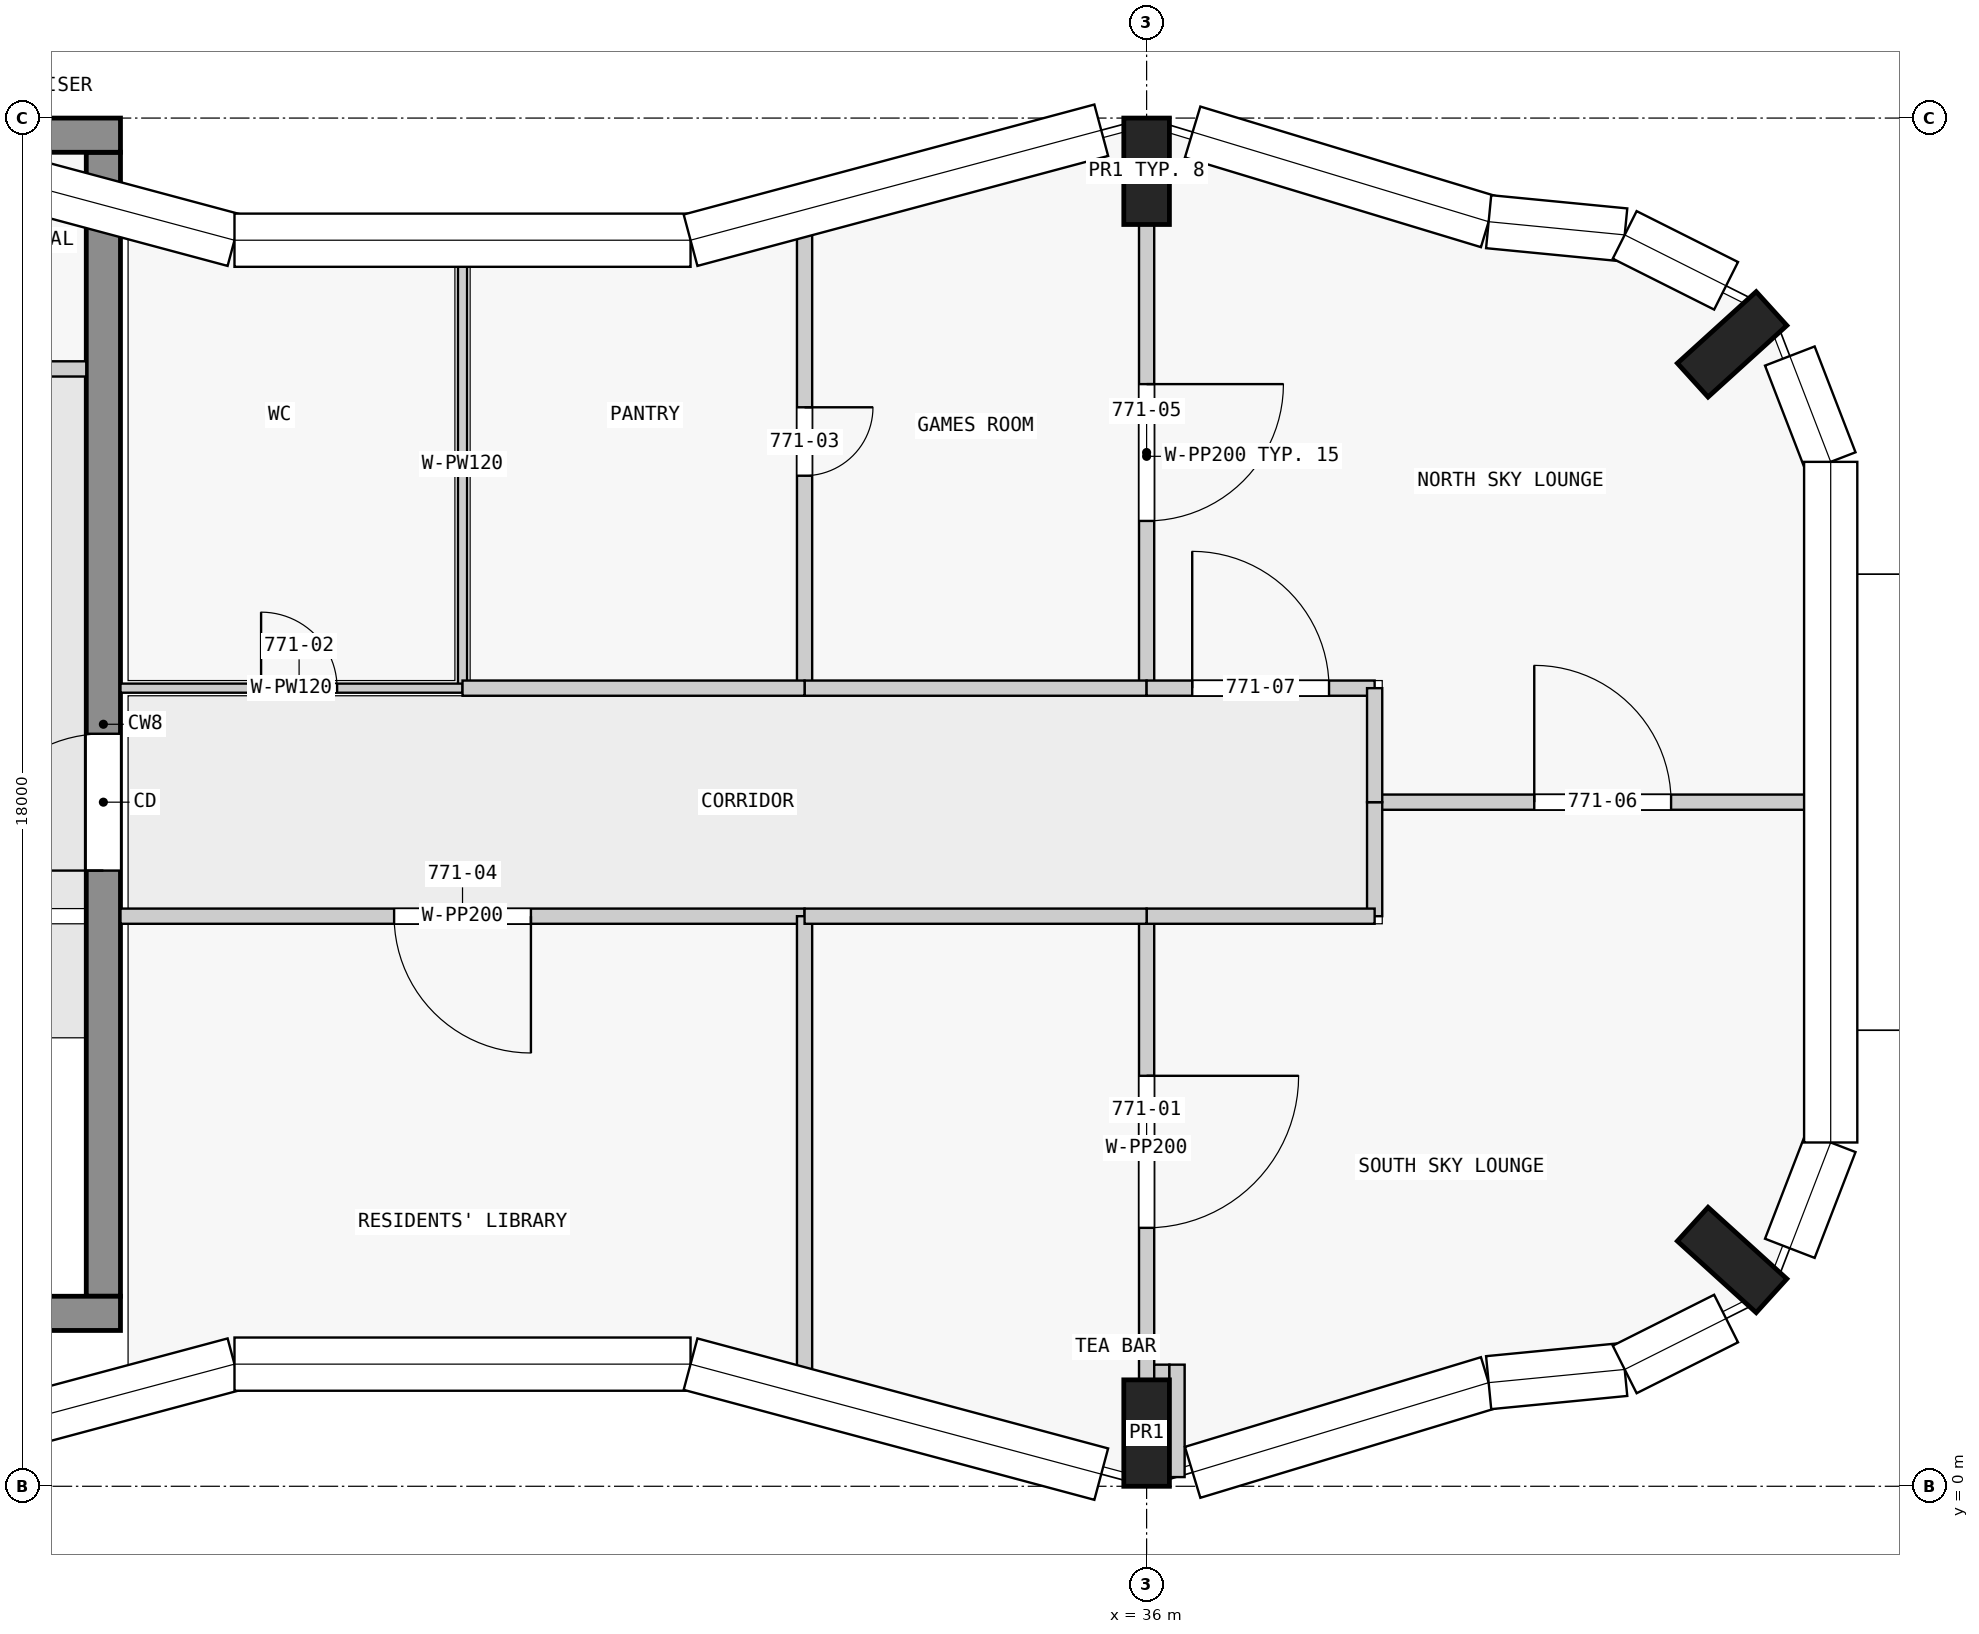
"""IFC4 building model, lengths in metres.
Left out: names, types, materials, properties, quantities, classifications, styles, units other than length and angle.
Written with IfcOpenShell. Run it as: python <this file> out.ifc"""

import sys

from ifc_helpers import new_model, si_unit, direction, frame, frame_2d, origin, origin_2d, place, context, subcontext, project, spatial, rectangle, extrude, element, fill, save


model = new_model("IFC4")
c1 = context("Model", 3, precision=1e-05, world=origin(), true_north=direction((0.0, 1.0)))
c2 = subcontext(c1, "Body", "Model", "MODEL_VIEW")
j1 = project(units=[si_unit("LENGTHUNIT", "METRE"), si_unit("PLANEANGLEUNIT", "RADIAN")], contexts=[c1])
p1 = place(None, origin())
s1 = spatial("IfcSite", under=j1, at=p1, CompositionType="ELEMENT")
p2 = place(p1, origin())
s2 = spatial("IfcBuilding", under=s1, at=p2, CompositionType="ELEMENT")
p3 = place(p2, frame((0.0, 0.0, 291.4)))
s3 = spatial("IfcBuildingStorey", under=s2, at=p3, CompositionType="ELEMENT", Elevation=291.4)
for number, where, z_axis, x_axis in (
    (1, (36.0, 0.7, 0.0), (0.0, 0.0, 1.0), (1.0, 0.0, 0.0)),
    (2, (43.703, 2.977, 0.0), (0.0, 0.0, 1.0), (0.672, 0.74, 0.0)),
    (3, (43.703, 15.023, 0.0), (0.0, 0.0, 1.0), (-0.672, 0.74, 0.0)),
    (4, (36.0, 17.3, 0.0), (0.0, 0.0, 1.0), (1.0, 0.0, 0.0)),
):
    element("IfcColumn", number, at=place(p3, frame(where, z_axis=z_axis, x_axis=x_axis)), inside=s3, PredefinedType="COLUMN", context=c2, shape_type="SweptSolid", body=[
        extrude(rectangle(XDim=0.6, YDim=1.4, at=origin_2d()), origin(), (0.0, 0.0, 1.0), 3.5),
    ])
for number, where, z_axis, x_axis in (
    (5, (1.85, 2.275, 0.0), (0.0, 0.0, 1.0), (1.0, 0.0, 0.0)),
    (6, (1.85, 17.775, 0.0), (0.0, 0.0, 1.0), (1.0, 0.0, 0.0)),
):
    element("IfcWall", number, at=place(p3, frame(where, z_axis=z_axis, x_axis=x_axis)), inside=s3, PredefinedType="SHEAR", context=c2, shape_type="SweptSolid", body=[
        extrude(rectangle(XDim=20.65, YDim=0.45, at=frame_2d((10.325, 0.0))), origin(), (0.0, 0.0, 1.0), 3.05),
    ])
p4 = place(p3, frame((22.275, 2.5, 0.0), z_axis=(0.0, 0.0, 1.0), x_axis=(0.0, 1.0, 0.0)))
e7 = element("IfcWall", 7, at=p4, inside=s3, PredefinedType="SHEAR", context=c2, shape_type="SweptSolid", body=[
    extrude(rectangle(XDim=15.05, YDim=0.45, at=frame_2d((7.525, 0.0))), origin(), (0.0, 0.0, 1.0), 3.05),
])
p5 = place(p4, frame((5.6, 0.0, 0.0)))
e8 = element("IfcOpeningElement", 8, at=p5, cuts=e7, PredefinedType="OPENING", context=c2, shape_type="SweptSolid", body=[
    extrude(rectangle(XDim=1.8, YDim=2.1, at=frame_2d((0.9, 1.05))), frame((0.0, 0.235, 0.0), z_axis=(0.0, -1.0, 0.0), x_axis=(1.0, 0.0, 0.0)), (0.0, 0.0, 1.0), 0.47),
])
p6 = place(p3, frame((18.6, 14.7, 0.0), z_axis=(0.0, 0.0, 1.0), x_axis=(1.0, 0.0, 0.0)))
e9 = element("IfcWall", 9, at=p6, inside=s3, PredefinedType="PARTITIONING", context=c2, shape_type="SweptSolid", body=[
    extrude(rectangle(XDim=3.45, YDim=0.2, at=frame_2d((1.725, 0.0))), origin(), (0.0, 0.0, 1.0), 3.05),
])
p7 = place(p6, frame((0.3, 0.0, 0.0)))
e10 = element("IfcOpeningElement", 10, at=p7, cuts=e9, PredefinedType="OPENING", context=c2, shape_type="SweptSolid", body=[
    extrude(rectangle(XDim=0.9, YDim=2.1, at=frame_2d((0.45, 1.05))), frame((0.0, 0.11, 0.0), z_axis=(0.0, -1.0, 0.0), x_axis=(1.0, 0.0, 0.0)), (0.0, 0.0, 1.0), 0.22),
])
p8 = place(p6, frame((2.025, 0.0, 0.0)))
e11 = element("IfcOpeningElement", 11, at=p8, cuts=e9, PredefinedType="OPENING", context=c2, shape_type="SweptSolid", body=[
    extrude(rectangle(XDim=0.9, YDim=2.1, at=frame_2d((0.45, 1.05))), frame((0.0, 0.11, 0.0), z_axis=(0.0, -1.0, 0.0), x_axis=(1.0, 0.0, 0.0)), (0.0, 0.0, 1.0), 0.22),
])
p9 = place(p3, frame((31.5, 7.5, 0.0), z_axis=(0.0, 0.0, 1.0), x_axis=(-1.0, 0.0, 0.0)))
e12 = element("IfcWall", 12, at=p9, inside=s3, PredefinedType="PARTITIONING", context=c2, shape_type="SweptSolid", body=[
    extrude(rectangle(XDim=9.0, YDim=0.2, at=frame_2d((4.5, 0.0))), origin(), (0.0, 0.0, 1.0), 3.05),
])
p10 = place(p9, frame((3.6, 0.0, 0.0)))
e13 = element("IfcOpeningElement", 13, at=p10, cuts=e12, PredefinedType="OPENING", context=c2, shape_type="SweptSolid", body=[
    extrude(rectangle(XDim=1.8, YDim=2.1, at=frame_2d((0.9, 1.05))), frame((0.0, 0.11, 0.0), z_axis=(0.0, -1.0, 0.0), x_axis=(1.0, 0.0, 0.0)), (0.0, 0.0, 1.0), 0.22),
])
p11 = place(p3, frame((36.0, 7.5, 0.0), z_axis=(0.0, 0.0, 1.0), x_axis=(0.0, -1.0, 0.0)))
e14 = element("IfcWall", 14, at=p11, inside=s3, PredefinedType="PARTITIONING", context=c2, shape_type="SweptSolid", body=[
    extrude(rectangle(XDim=6.1, YDim=0.2, at=frame_2d((3.05, 0.0))), origin(), (0.0, 0.0, 1.0), 3.05),
])
p12 = place(p11, frame((2.1, 0.0, 0.0)))
e15 = element("IfcOpeningElement", 15, at=p12, cuts=e14, PredefinedType="OPENING", context=c2, shape_type="SweptSolid", body=[
    extrude(rectangle(XDim=2.0, YDim=2.4, at=frame_2d((1.0, 1.2))), frame((0.0, 0.11, 0.0), z_axis=(0.0, -1.0, 0.0), x_axis=(1.0, 0.0, 0.0)), (0.0, 0.0, 1.0), 0.22),
])
p13 = place(p3, frame((36.1, 1.5, 0.0), z_axis=(0.0, 0.0, 1.0), x_axis=(1.0, 0.0, 0.0)))
e16 = element("IfcWall", 16, at=p13, inside=s3, PredefinedType="PARTITIONING", context=c2, shape_type="SweptSolid", body=[
    extrude(rectangle(XDim=0.2, YDim=0.2, at=frame_2d((0.1, 0.0))), origin(), (0.0, 0.0, 1.0), 3.05),
])
p14 = place(p3, frame((36.4, 1.6, 0.0), z_axis=(0.0, 0.0, 1.0), x_axis=(0.0, -1.0, 0.0)))
e17 = element("IfcWall", 17, at=p14, inside=s3, PredefinedType="PARTITIONING", context=c2, shape_type="SweptSolid", body=[
    extrude(rectangle(XDim=1.479, YDim=0.2, at=frame_2d((0.74, 0.0))), origin(), (0.0, 0.0, 1.0), 2.517),
])
p15 = place(p3, frame((36.0, 16.6, 0.0), z_axis=(0.0, 0.0, 1.0), x_axis=(0.0, -1.0, 0.0)))
e18 = element("IfcWall", 18, at=p15, inside=s3, PredefinedType="PARTITIONING", context=c2, shape_type="SweptSolid", body=[
    extrude(rectangle(XDim=6.1, YDim=0.2, at=frame_2d((3.05, 0.0))), origin(), (0.0, 0.0, 1.0), 3.05),
])
p16 = place(p15, frame((2.1, 0.0, 0.0)))
e19 = element("IfcOpeningElement", 19, at=p16, cuts=e18, PredefinedType="OPENING", context=c2, shape_type="SweptSolid", body=[
    extrude(rectangle(XDim=1.8, YDim=2.1, at=frame_2d((0.9, 1.05))), frame((0.0, 0.11, 0.0), z_axis=(0.0, -1.0, 0.0), x_axis=(1.0, 0.0, 0.0)), (0.0, 0.0, 1.0), 0.22),
])
p17 = place(p3, frame((31.5, 16.795, 0.0), z_axis=(0.0, 0.0, 1.0), x_axis=(0.0, -1.0, 0.0)))
e20 = element("IfcWall", 20, at=p17, inside=s3, PredefinedType="PARTITIONING", context=c2, shape_type="SweptSolid", body=[
    extrude(rectangle(XDim=6.295, YDim=0.2, at=frame_2d((3.147, 0.0))), origin(), (0.0, 0.0, 1.0), 3.05),
])
p18 = place(p17, frame((2.6, 0.0, 0.0)))
e21 = element("IfcOpeningElement", 21, at=p18, cuts=e20, PredefinedType="OPENING", context=c2, shape_type="SweptSolid", body=[
    extrude(rectangle(XDim=0.9, YDim=2.1, at=frame_2d((0.45, 1.05))), frame((0.0, 0.11, 0.0), z_axis=(0.0, -1.0, 0.0), x_axis=(1.0, 0.0, 0.0)), (0.0, 0.0, 1.0), 0.22),
])
p19 = place(p3, frame((31.5, 7.5, 0.0), z_axis=(0.0, 0.0, 1.0), x_axis=(0.0, -1.0, 0.0)))
e22 = element("IfcWall", 22, at=p19, inside=s3, PredefinedType="PARTITIONING", context=c2, shape_type="SweptSolid", body=[
    extrude(rectangle(XDim=6.295, YDim=0.2, at=frame_2d((3.147, 0.0))), origin(), (0.0, 0.0, 1.0), 3.05),
])
p20 = place(p3, frame((39.0, 9.0, 0.0), z_axis=(0.0, 0.0, 1.0), x_axis=(1.0, 0.0, 0.0)))
e23 = element("IfcWall", 23, at=p20, inside=s3, PredefinedType="PARTITIONING", context=c2, shape_type="SweptSolid", body=[
    extrude(rectangle(XDim=6.0, YDim=0.2, at=frame_2d((3.0, 0.0))), origin(), (0.0, 0.0, 1.0), 3.05),
])
p21 = place(p20, frame((2.1, 0.0, 0.0)))
e24 = element("IfcOpeningElement", 24, at=p21, cuts=e23, PredefinedType="OPENING", context=c2, shape_type="SweptSolid", body=[
    extrude(rectangle(XDim=1.8, YDim=2.1, at=frame_2d((0.9, 1.05))), frame((0.0, 0.11, 0.0), z_axis=(0.0, -1.0, 0.0), x_axis=(1.0, 0.0, 0.0)), (0.0, 0.0, 1.0), 0.22),
])
p22 = place(p3, frame((27.0, 16.393, 0.0), z_axis=(0.0, 0.0, 1.0), x_axis=(0.0, -1.0, 0.0)))
e25 = element("IfcWall", 25, at=p22, inside=s3, PredefinedType="PARTITIONING", context=c2, shape_type="SweptSolid", body=[
    extrude(rectangle(XDim=5.893, YDim=0.12, at=frame_2d((2.947, 0.0))), origin(), (0.0, 0.0, 1.0), 3.05),
])
p23 = place(p3, frame((39.0, 9.0, 0.0), z_axis=(0.0, 0.0, 1.0), x_axis=(0.0, -1.0, 0.0)))
e26 = element("IfcWall", 26, at=p23, inside=s3, PredefinedType="PARTITIONING", context=c2, shape_type="SweptSolid", body=[
    extrude(rectangle(XDim=1.5, YDim=0.2, at=frame_2d((0.75, 0.0))), origin(), (0.0, 0.0, 1.0), 3.05),
])
p24 = place(p3, frame((39.0, 7.5, 0.0), z_axis=(0.0, 0.0, 1.0), x_axis=(-1.0, 0.0, 0.0)))
e27 = element("IfcWall", 27, at=p24, inside=s3, PredefinedType="PARTITIONING", context=c2, shape_type="SweptSolid", body=[
    extrude(rectangle(XDim=3.0, YDim=0.2, at=frame_2d((1.5, 0.0))), origin(), (0.0, 0.0, 1.0), 3.05),
])
p25 = place(p3, frame((31.5, 10.5, 0.0), z_axis=(0.0, 0.0, 1.0), x_axis=(1.0, 0.0, 0.0)))
e28 = element("IfcWall", 28, at=p25, inside=s3, PredefinedType="PARTITIONING", context=c2, shape_type="SweptSolid", body=[
    extrude(rectangle(XDim=4.5, YDim=0.2, at=frame_2d((2.25, 0.0))), origin(), (0.0, 0.0, 1.0), 3.05),
])
p26 = place(p3, frame((22.5, 10.5, 0.0), z_axis=(0.0, 0.0, 1.0), x_axis=(1.0, 0.0, 0.0)))
e29 = element("IfcWall", 29, at=p26, inside=s3, PredefinedType="PARTITIONING", context=c2, shape_type="SweptSolid", body=[
    extrude(rectangle(XDim=4.5, YDim=0.12, at=frame_2d((2.25, 0.0))), origin(), (0.0, 0.0, 1.0), 3.05),
])
p27 = place(p26, frame((1.85, 0.0, 0.0)))
e30 = element("IfcOpeningElement", 30, at=p27, cuts=e29, PredefinedType="OPENING", context=c2, shape_type="SweptSolid", body=[
    extrude(rectangle(XDim=1.0, YDim=2.1, at=frame_2d((0.5, 1.05))), frame((0.0, 0.07, 0.0), z_axis=(0.0, -1.0, 0.0), x_axis=(1.0, 0.0, 0.0)), (0.0, 0.0, 1.0), 0.14),
])
for number, where, z_axis, x_axis in (
    (31, (27.0, 10.5, 0.0), (0.0, 0.0, 1.0), (1.0, 0.0, 0.0)),
    (32, (36.0, 7.5, 0.0), (0.0, 0.0, 1.0), (-1.0, 0.0, 0.0)),
):
    element("IfcWall", number, at=place(p3, frame(where, z_axis=z_axis, x_axis=x_axis)), inside=s3, PredefinedType="PARTITIONING", context=c2, shape_type="SweptSolid", body=[
        extrude(rectangle(XDim=4.5, YDim=0.2, at=frame_2d((2.25, 0.0))), origin(), (0.0, 0.0, 1.0), 3.05),
    ])
p28 = place(p3, frame((36.0, 10.5, 0.0), z_axis=(0.0, 0.0, 1.0), x_axis=(1.0, 0.0, 0.0)))
e33 = element("IfcWall", 33, at=p28, inside=s3, PredefinedType="PARTITIONING", context=c2, shape_type="SweptSolid", body=[
    extrude(rectangle(XDim=3.0, YDim=0.2, at=frame_2d((1.5, 0.0))), origin(), (0.0, 0.0, 1.0), 3.05),
])
p29 = place(p28, frame((0.6, 0.0, 0.0)))
e34 = element("IfcOpeningElement", 34, at=p29, cuts=e33, PredefinedType="OPENING", context=c2, shape_type="SweptSolid", body=[
    extrude(rectangle(XDim=1.8, YDim=2.1, at=frame_2d((0.9, 1.05))), frame((0.0, 0.11, 0.0), z_axis=(0.0, -1.0, 0.0), x_axis=(1.0, 0.0, 0.0)), (0.0, 0.0, 1.0), 0.22),
])
p30 = place(p3, frame((39.0, 10.5, 0.0), z_axis=(0.0, 0.0, 1.0), x_axis=(0.0, -1.0, 0.0)))
e35 = element("IfcWall", 35, at=p30, inside=s3, PredefinedType="PARTITIONING", context=c2, shape_type="SweptSolid", body=[
    extrude(rectangle(XDim=1.5, YDim=0.2, at=frame_2d((0.75, 0.0))), origin(), (0.0, 0.0, 1.0), 3.05),
])
p31 = place(p5, origin())
e36 = element("IfcDoor", 36, at=p31, inside=s3, OperationType="DOUBLE_DOOR_SINGLE_SWING", PredefinedType="DOOR", context=c2, shape_type="SweptSolid", body=[
    extrude(rectangle(XDim=1.8, YDim=2.1, at=frame_2d((0.9, 1.05))), frame((0.0, 0.025, 0.0), z_axis=(0.0, -1.0, 0.0), x_axis=(1.0, 0.0, 0.0)), (0.0, 0.0, 1.0), 0.05),
])
fill(e8, e36)
p32 = place(p12, origin())
e37 = element("IfcDoor", 37, at=p32, inside=s3, OperationType="SINGLE_SWING_LEFT", PredefinedType="DOOR", context=c2, shape_type="SweptSolid", body=[
    extrude(rectangle(XDim=2.0, YDim=2.4, at=frame_2d((1.0, 1.2))), frame((0.0, 0.025, 0.0), z_axis=(0.0, -1.0, 0.0), x_axis=(1.0, 0.0, 0.0)), (0.0, 0.0, 1.0), 0.05),
])
fill(e15, e37)
p33 = place(p27, origin())
e38 = element("IfcDoor", 38, at=p33, inside=s3, OperationType="SINGLE_SWING_LEFT", PredefinedType="DOOR", context=c2, shape_type="SweptSolid", body=[
    extrude(rectangle(XDim=1.0, YDim=2.1, at=frame_2d((0.5, 1.05))), frame((0.0, 0.025, 0.0), z_axis=(0.0, -1.0, 0.0), x_axis=(1.0, 0.0, 0.0)), (0.0, 0.0, 1.0), 0.05),
])
fill(e30, e38)
p34 = place(p18, origin())
e39 = element("IfcDoor", 39, at=p34, inside=s3, OperationType="SINGLE_SWING_LEFT", PredefinedType="DOOR", context=c2, shape_type="SweptSolid", body=[
    extrude(rectangle(XDim=0.9, YDim=2.1, at=frame_2d((0.45, 1.05))), frame((0.0, 0.025, 0.0), z_axis=(0.0, -1.0, 0.0), x_axis=(1.0, 0.0, 0.0)), (0.0, 0.0, 1.0), 0.05),
])
fill(e21, e39)
p35 = place(p10, origin())
e40 = element("IfcDoor", 40, at=p35, inside=s3, OperationType="DOUBLE_DOOR_SINGLE_SWING", PredefinedType="DOOR", context=c2, shape_type="SweptSolid", body=[
    extrude(rectangle(XDim=1.8, YDim=2.1, at=frame_2d((0.9, 1.05))), frame((0.0, 0.025, 0.0), z_axis=(0.0, -1.0, 0.0), x_axis=(1.0, 0.0, 0.0)), (0.0, 0.0, 1.0), 0.05),
])
fill(e13, e40)
p36 = place(p16, origin())
e41 = element("IfcDoor", 41, at=p36, inside=s3, OperationType="DOUBLE_DOOR_SINGLE_SWING", PredefinedType="DOOR", context=c2, shape_type="SweptSolid", body=[
    extrude(rectangle(XDim=1.8, YDim=2.1, at=frame_2d((0.9, 1.05))), frame((0.0, 0.025, 0.0), z_axis=(0.0, -1.0, 0.0), x_axis=(1.0, 0.0, 0.0)), (0.0, 0.0, 1.0), 0.05),
])
fill(e19, e41)
p37 = place(p21, origin())
e42 = element("IfcDoor", 42, at=p37, inside=s3, OperationType="DOUBLE_DOOR_SINGLE_SWING", PredefinedType="DOOR", context=c2, shape_type="SweptSolid", body=[
    extrude(rectangle(XDim=1.8, YDim=2.1, at=frame_2d((0.9, 1.05))), frame((0.0, 0.025, 0.0), z_axis=(0.0, -1.0, 0.0), x_axis=(1.0, 0.0, 0.0)), (0.0, 0.0, 1.0), 0.05),
])
fill(e24, e42)
p38 = place(p29, origin())
e43 = element("IfcDoor", 43, at=p38, inside=s3, OperationType="DOUBLE_DOOR_SINGLE_SWING", PredefinedType="DOOR", context=c2, shape_type="SweptSolid", body=[
    extrude(rectangle(XDim=1.8, YDim=2.1, at=frame_2d((0.9, 1.05))), frame((0.0, 0.025, 0.0), z_axis=(0.0, -1.0, 0.0), x_axis=(1.0, 0.0, 0.0)), (0.0, 0.0, 1.0), 0.05),
])
fill(e34, e43)
save(model, sys.argv[1])
